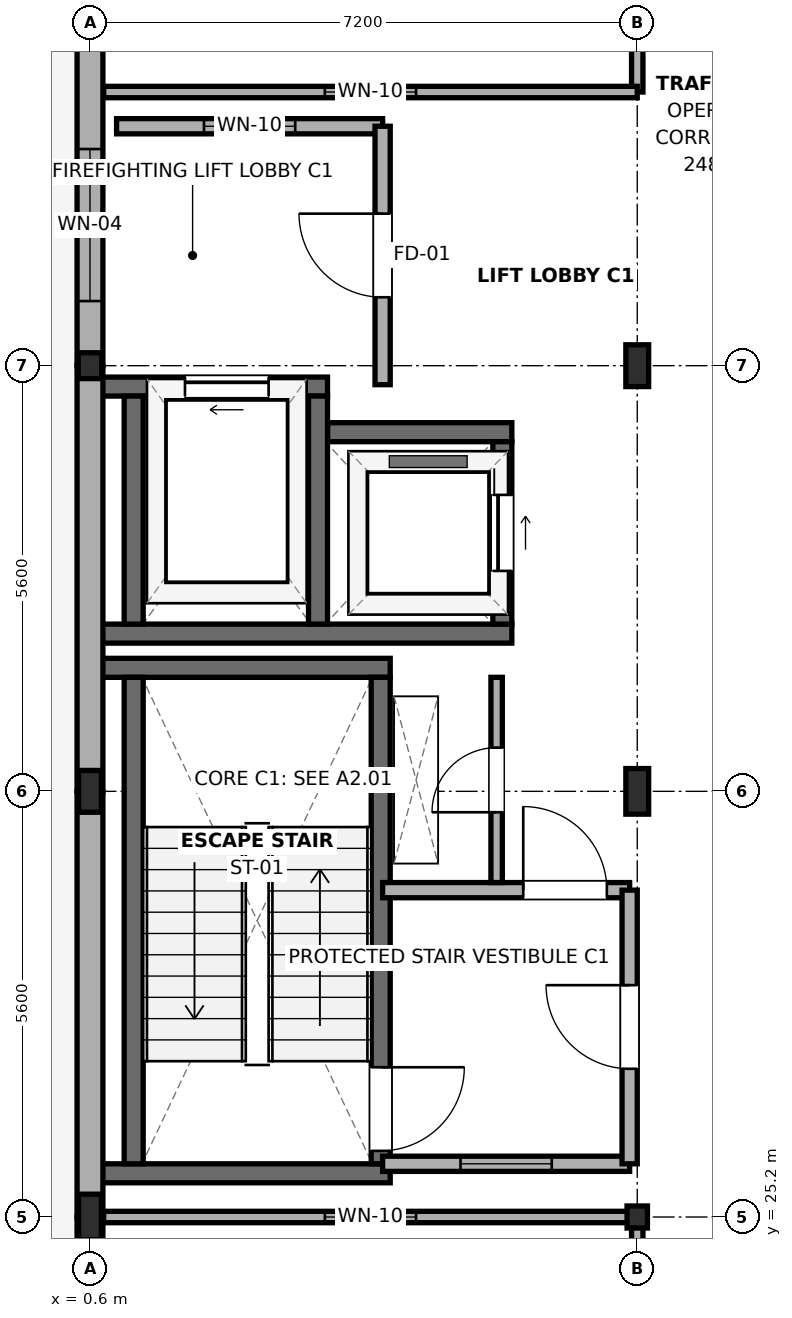
"""IFC4 building model, lengths in metres.
Left out: names, types, materials, properties, quantities, classifications, styles, units other than length and angle.
Written with IfcOpenShell. Run it as: python <this file> out.ifc"""

import sys

from ifc_helpers import new_model, si_unit, direction, frame, frame_2d, origin, origin_2d, place, context, subcontext, project, spatial, rectangle, i_section, extrude, element, fill, save


model = new_model("IFC4")
c1 = context("Model", 3, precision=1e-05, world=origin(), true_north=direction((0.0, 1.0)))
c2 = subcontext(c1, "Body", "Model", "MODEL_VIEW")
j1 = project(units=[si_unit("LENGTHUNIT", "METRE"), si_unit("PLANEANGLEUNIT", "RADIAN")], contexts=[c1])
p1 = place(None, origin())
s1 = spatial("IfcSite", under=j1, at=p1, CompositionType="ELEMENT")
p2 = place(p1, origin())
s2 = spatial("IfcBuilding", under=s1, at=p2, CompositionType="ELEMENT")
p3 = place(p2, frame((0.0, 0.0, 9.0)))
s3 = spatial("IfcBuildingStorey", under=s2, at=p3, CompositionType="ELEMENT", Elevation=9.0)
p4 = place(p3, frame((0.6, 25.2, 0.0), z_axis=(0.0, 0.0, 1.0), x_axis=(1.0, 0.0, 0.0)))
e1 = element("IfcColumn", 1, at=p4, inside=s3, PredefinedType="COLUMN", context=c2, shape_type="SweptSolid", body=[
    extrude(i_section(OverallWidth=0.3, OverallDepth=0.6, WebThickness=0.015, FlangeThickness=0.03, FilletRadius=0.027, at=origin_2d()), origin(), (0.0, 0.0, 1.0), 4.2),
])
p5 = place(p3, frame((0.6, 30.8, 0.0), z_axis=(0.0, 0.0, 1.0), x_axis=(1.0, 0.0, 0.0)))
e2 = element("IfcColumn", 2, at=p5, inside=s3, PredefinedType="COLUMN", context=c2, shape_type="SweptSolid", body=[
    extrude(i_section(OverallWidth=0.3, OverallDepth=0.55, WebThickness=0.015, FlangeThickness=0.029, FilletRadius=0.027, at=origin_2d()), origin(), (0.0, 0.0, 1.0), 4.2),
])
p6 = place(p3, frame((0.6, 36.4, 0.0), z_axis=(0.0, 0.0, 1.0), x_axis=(1.0, 0.0, 0.0)))
e3 = element("IfcColumn", 3, at=p6, inside=s3, PredefinedType="COLUMN", context=c2, shape_type="SweptSolid", body=[
    extrude(i_section(OverallWidth=0.31, OverallDepth=0.34, WebThickness=0.021, FlangeThickness=0.039, FilletRadius=0.027, at=origin_2d()), origin(), (0.0, 0.0, 1.0), 4.2),
])
p7 = place(p3, frame((7.8, 25.2, 0.0), z_axis=(0.0, 0.0, 1.0), x_axis=(1.0, 0.0, 0.0)))
e4 = element("IfcColumn", 4, at=p7, inside=s3, PredefinedType="COLUMN", context=c2, shape_type="SweptSolid", body=[
    extrude(i_section(OverallWidth=0.268, OverallDepth=0.29, WebThickness=0.018, FlangeThickness=0.032, FilletRadius=0.024, at=origin_2d()), origin(), (0.0, 0.0, 1.0), 4.2),
])
p8 = place(p3, frame((7.8, 30.8, 0.0), z_axis=(0.0, 0.0, 1.0), x_axis=(1.0, 0.0, 0.0)))
e5 = element("IfcColumn", 5, at=p8, inside=s3, PredefinedType="COLUMN", context=c2, shape_type="SweptSolid", body=[
    extrude(i_section(OverallWidth=0.3, OverallDepth=0.6, WebThickness=0.015, FlangeThickness=0.03, FilletRadius=0.027, at=origin_2d()), origin(), (0.0, 0.0, 1.0), 4.2),
])
p9 = place(p3, frame((7.8, 36.4, 0.0), z_axis=(0.0, 0.0, 1.0), x_axis=(1.0, 0.0, 0.0)))
e6 = element("IfcColumn", 6, at=p9, inside=s3, PredefinedType="COLUMN", context=c2, shape_type="SweptSolid", body=[
    extrude(i_section(OverallWidth=0.3, OverallDepth=0.55, WebThickness=0.015, FlangeThickness=0.029, FilletRadius=0.027, at=origin_2d()), origin(), (0.0, 0.0, 1.0), 4.2),
])
for number, where, z_axis, x_axis in (
    (7, (0.75, 25.775, 0.0), (0.0, 0.0, 1.0), (1.0, 0.0, 0.0)),
    (8, (0.75, 32.425, 0.0), (0.0, 0.0, 1.0), (1.0, 0.0, 0.0)),
):
    element("IfcWall", number, at=place(p3, frame(where, z_axis=z_axis, x_axis=x_axis)), inside=s3, PredefinedType="SHEAR", context=c2, shape_type="SweptSolid", body=[
        extrude(rectangle(XDim=3.8, YDim=0.25, at=frame_2d((1.9, 0.0))), origin(), (0.0, 0.0, 1.0), 3.98),
    ])
p10 = place(p3, frame((1.175, 25.9, 0.0), z_axis=(0.0, 0.0, 1.0), x_axis=(0.0, 1.0, 0.0)))
e9 = element("IfcWall", 9, at=p10, inside=s3, PredefinedType="SHEAR", context=c2, shape_type="SweptSolid", body=[
    extrude(rectangle(XDim=6.4, YDim=0.25, at=frame_2d((3.2, 0.0))), origin(), (0.0, 0.0, 1.0), 3.98),
])
p11 = place(p3, frame((4.425, 25.9, 0.0), z_axis=(0.0, 0.0, 1.0), x_axis=(0.0, 1.0, 0.0)))
e10 = element("IfcWall", 10, at=p11, inside=s3, PredefinedType="SHEAR", context=c2, shape_type="SweptSolid", body=[
    extrude(rectangle(XDim=6.4, YDim=0.25, at=frame_2d((3.2, 0.0))), origin(), (0.0, 0.0, 1.0), 3.98),
])
p12 = place(p11, frame((0.17, 0.0, 0.0)))
e11 = element("IfcOpeningElement", 11, at=p12, cuts=e10, PredefinedType="OPENING", context=c2, shape_type="SweptSolid", body=[
    extrude(rectangle(XDim=1.1, YDim=2.15, at=frame_2d((0.55, 1.075))), frame((0.0, 0.14, 0.0), z_axis=(0.0, -1.0, 0.0), x_axis=(1.0, 0.0, 0.0)), (0.0, 0.0, 1.0), 0.28),
])
p13 = place(p3, frame((0.75, 32.875, 0.0), z_axis=(0.0, 0.0, 1.0), x_axis=(1.0, 0.0, 0.0)))
e12 = element("IfcWall", 12, at=p13, inside=s3, PredefinedType="SHEAR", context=c2, shape_type="SweptSolid", body=[
    extrude(rectangle(XDim=5.4, YDim=0.25, at=frame_2d((2.7, 0.0))), origin(), (0.0, 0.0, 1.0), 3.98),
])
p14 = place(p3, frame((0.75, 36.125, 0.0), z_axis=(0.0, 0.0, 1.0), x_axis=(1.0, 0.0, 0.0)))
e13 = element("IfcWall", 13, at=p14, inside=s3, PredefinedType="SHEAR", context=c2, shape_type="SweptSolid", body=[
    extrude(rectangle(XDim=2.975, YDim=0.25, at=frame_2d((1.488, 0.0))), origin(), (0.0, 0.0, 1.0), 3.98),
])
p15 = place(p14, frame((1.1, 0.0, 0.0)))
e14 = element("IfcOpeningElement", 14, at=p15, cuts=e13, PredefinedType="OPENING", context=c2, shape_type="SweptSolid", body=[
    extrude(rectangle(XDim=1.1, YDim=2.15, at=frame_2d((0.55, 1.075))), frame((0.0, 0.14, 0.0), z_axis=(0.0, -1.0, 0.0), x_axis=(1.0, 0.0, 0.0)), (0.0, 0.0, 1.0), 0.28),
])
p16 = place(p3, frame((3.725, 35.525, 0.0), z_axis=(0.0, 0.0, 1.0), x_axis=(1.0, 0.0, 0.0)))
e15 = element("IfcWall", 15, at=p16, inside=s3, PredefinedType="SHEAR", context=c2, shape_type="SweptSolid", body=[
    extrude(rectangle(XDim=2.425, YDim=0.25, at=frame_2d((1.212, 0.0))), origin(), (0.0, 0.0, 1.0), 3.98),
])
for number, where, z_axis, x_axis in (
    (16, (1.175, 33.0, 0.0), (0.0, 0.0, 1.0), (0.0, 1.0, 0.0)),
    (17, (3.6, 33.0, 0.0), (0.0, 0.0, 1.0), (0.0, 1.0, 0.0)),
):
    element("IfcWall", number, at=place(p3, frame(where, z_axis=z_axis, x_axis=x_axis)), inside=s3, PredefinedType="SHEAR", context=c2, shape_type="SweptSolid", body=[
        extrude(rectangle(XDim=3.0, YDim=0.25, at=frame_2d((1.5, 0.0))), origin(), (0.0, 0.0, 1.0), 3.98),
    ])
p17 = place(p3, frame((6.025, 33.0, 0.0), z_axis=(0.0, 0.0, 1.0), x_axis=(0.0, 1.0, 0.0)))
e18 = element("IfcWall", 18, at=p17, inside=s3, PredefinedType="SHEAR", context=c2, shape_type="SweptSolid", body=[
    extrude(rectangle(XDim=2.4, YDim=0.25, at=frame_2d((1.2, 0.0))), origin(), (0.0, 0.0, 1.0), 3.98),
])
p18 = place(p17, frame((0.7, 0.0, 0.0)))
e19 = element("IfcOpeningElement", 19, at=p18, cuts=e18, PredefinedType="OPENING", context=c2, shape_type="SweptSolid", body=[
    extrude(rectangle(XDim=1.0, YDim=2.15, at=frame_2d((0.5, 1.075))), frame((0.0, 0.14, 0.0), z_axis=(0.0, -1.0, 0.0), x_axis=(1.0, 0.0, 0.0)), (0.0, 0.0, 1.0), 0.28),
])
p19 = place(p3, frame((0.6, 17.23, 0.0), z_axis=(0.0, 0.0, 1.0), x_axis=(0.0, 1.0, 0.0)))
e20 = element("IfcWall", 20, at=p19, inside=s3, PredefinedType="SOLIDWALL", context=c2, shape_type="SweptSolid", body=[
    extrude(rectangle(XDim=7.97, YDim=0.34, at=frame_2d((3.985, 0.0))), origin(), (0.0, 0.0, 1.0), 3.525),
])
p20 = place(p3, frame((0.6, 25.2, 0.0), z_axis=(0.0, 0.0, 1.0), x_axis=(0.0, 1.0, 0.0)))
e21 = element("IfcWall", 21, at=p20, inside=s3, PredefinedType="SOLIDWALL", context=c2, shape_type="SweptSolid", body=[
    extrude(rectangle(XDim=5.6, YDim=0.34, at=frame_2d((2.8, 0.0))), origin(), (0.0, 0.0, 1.0), 3.625),
])
p21 = place(p3, frame((0.6, 30.8, 0.0), z_axis=(0.0, 0.0, 1.0), x_axis=(0.0, 1.0, 0.0)))
e22 = element("IfcWall", 22, at=p21, inside=s3, PredefinedType="SOLIDWALL", context=c2, shape_type="SweptSolid", body=[
    extrude(rectangle(XDim=5.6, YDim=0.34, at=frame_2d((2.8, 0.0))), origin(), (0.0, 0.0, 1.0), 3.375),
])
p22 = place(p3, frame((0.6, 36.4, 0.0), z_axis=(0.0, 0.0, 1.0), x_axis=(0.0, 1.0, 0.0)))
e23 = element("IfcWall", 23, at=p22, inside=s3, PredefinedType="SOLIDWALL", context=c2, shape_type="SweptSolid", body=[
    extrude(rectangle(XDim=5.6, YDim=0.34, at=frame_2d((2.8, 0.0))), origin(), (0.0, 0.0, 1.0), 3.375),
])
p23 = place(p22, frame((0.85, 0.0, 0.9)))
e24 = element("IfcOpeningElement", 24, at=p23, cuts=e23, PredefinedType="OPENING", context=c2, shape_type="SweptSolid", body=[
    extrude(rectangle(XDim=2.0, YDim=1.8, at=frame_2d((1.0, 0.9))), frame((0.0, 0.185, 0.0), z_axis=(0.0, -1.0, 0.0), x_axis=(1.0, 0.0, 0.0)), (0.0, 0.0, 1.0), 0.37),
])
p24 = place(p3, frame((0.95, 39.55, 0.0), z_axis=(0.0, 0.0, 1.0), x_axis=(1.0, 0.0, 0.0)))
e25 = element("IfcWall", 25, at=p24, inside=s3, PredefinedType="PARTITIONING", context=c2, shape_type="SweptSolid", body=[
    extrude(rectangle(XDim=3.5, YDim=0.2, at=frame_2d((1.75, 0.0))), origin(), (0.0, 0.0, 1.0), 3.975),
])
p25 = place(p24, frame((1.15, 0.0, 0.95)))
e26 = element("IfcOpeningElement", 26, at=p25, cuts=e25, PredefinedType="OPENING", context=c2, shape_type="SweptSolid", body=[
    extrude(rectangle(XDim=1.2, YDim=1.5, at=frame_2d((0.6, 0.75))), frame((0.0, 0.115, 0.0), z_axis=(0.0, -1.0, 0.0), x_axis=(1.0, 0.0, 0.0)), (0.0, 0.0, 1.0), 0.23),
])
p26 = place(p3, frame((4.45, 36.15, 0.0), z_axis=(0.0, 0.0, 1.0), x_axis=(0.0, 1.0, 0.0)))
e27 = element("IfcWall", 27, at=p26, inside=s3, PredefinedType="PARTITIONING", context=c2, shape_type="SweptSolid", body=[
    extrude(rectangle(XDim=3.4, YDim=0.2, at=frame_2d((1.7, 0.0))), origin(), (0.0, 0.0, 1.0), 3.645),
])
p27 = place(p26, frame((1.15, 0.0, 0.0)))
e28 = element("IfcOpeningElement", 28, at=p27, cuts=e27, PredefinedType="OPENING", context=c2, shape_type="SweptSolid", body=[
    extrude(rectangle(XDim=1.1, YDim=2.15, at=frame_2d((0.55, 1.075))), frame((0.0, 0.115, 0.0), z_axis=(0.0, -1.0, 0.0), x_axis=(1.0, 0.0, 0.0)), (0.0, 0.0, 1.0), 0.23),
])
p28 = place(p3, frame((4.45, 25.9, 0.0), z_axis=(0.0, 0.0, 1.0), x_axis=(1.0, 0.0, 0.0)))
e29 = element("IfcWall", 29, at=p28, inside=s3, PredefinedType="PARTITIONING", context=c2, shape_type="SweptSolid", body=[
    extrude(rectangle(XDim=3.25, YDim=0.2, at=frame_2d((1.625, 0.0))), origin(), (0.0, 0.0, 1.0), 3.475),
])
p29 = place(p28, frame((1.025, 0.0, 0.95)))
e30 = element("IfcOpeningElement", 30, at=p29, cuts=e29, PredefinedType="OPENING", context=c2, shape_type="SweptSolid", body=[
    extrude(rectangle(XDim=1.2, YDim=1.5, at=frame_2d((0.6, 0.75))), frame((0.0, 0.115, 0.0), z_axis=(0.0, -1.0, 0.0), x_axis=(1.0, 0.0, 0.0)), (0.0, 0.0, 1.0), 0.23),
])
p30 = place(p3, frame((4.45, 29.5, 0.0), z_axis=(0.0, 0.0, 1.0), x_axis=(1.0, 0.0, 0.0)))
e31 = element("IfcWall", 31, at=p30, inside=s3, PredefinedType="PARTITIONING", context=c2, shape_type="SweptSolid", body=[
    extrude(rectangle(XDim=3.25, YDim=0.2, at=frame_2d((1.625, 0.0))), origin(), (0.0, 0.0, 1.0), 3.475),
])
p31 = place(p30, frame((1.85, 0.0, 0.0)))
e32 = element("IfcOpeningElement", 32, at=p31, cuts=e31, PredefinedType="OPENING", context=c2, shape_type="SweptSolid", body=[
    extrude(rectangle(XDim=1.1, YDim=2.15, at=frame_2d((0.55, 1.075))), frame((0.0, 0.115, 0.0), z_axis=(0.0, -1.0, 0.0), x_axis=(1.0, 0.0, 0.0)), (0.0, 0.0, 1.0), 0.23),
])
p32 = place(p3, frame((7.7, 25.9, 0.0), z_axis=(0.0, 0.0, 1.0), x_axis=(0.0, 1.0, 0.0)))
e33 = element("IfcWall", 33, at=p32, inside=s3, PredefinedType="PARTITIONING", context=c2, shape_type="SweptSolid", body=[
    extrude(rectangle(XDim=3.6, YDim=0.2, at=frame_2d((1.8, 0.0))), origin(), (0.0, 0.0, 1.0), 3.475),
])
p33 = place(p32, frame((1.25, 0.0, 0.0)))
e34 = element("IfcOpeningElement", 34, at=p33, cuts=e33, PredefinedType="OPENING", context=c2, shape_type="SweptSolid", body=[
    extrude(rectangle(XDim=1.1, YDim=2.15, at=frame_2d((0.55, 1.075))), frame((0.0, 0.115, 0.0), z_axis=(0.0, -1.0, 0.0), x_axis=(1.0, 0.0, 0.0)), (0.0, 0.0, 1.0), 0.23),
])
p34 = place(p3, frame((5.95, 29.6, 0.0), z_axis=(0.0, 0.0, 1.0), x_axis=(0.0, 1.0, 0.0)))
e35 = element("IfcWall", 35, at=p34, inside=s3, PredefinedType="PARTITIONING", context=c2, shape_type="SweptSolid", body=[
    extrude(rectangle(XDim=2.7, YDim=0.15, at=frame_2d((1.35, 0.0))), origin(), (0.0, 0.0, 1.0), 3.975),
])
p35 = place(p34, frame((0.925, 0.0, 0.0)))
e36 = element("IfcOpeningElement", 36, at=p35, cuts=e35, PredefinedType="OPENING", context=c2, shape_type="SweptSolid", body=[
    extrude(rectangle(XDim=0.85, YDim=2.1, at=frame_2d((0.425, 1.05))), frame((0.0, 0.09, 0.0), z_axis=(0.0, -1.0, 0.0), x_axis=(1.0, 0.0, 0.0)), (0.0, 0.0, 1.0), 0.18),
])
p36 = place(p3, frame((7.8, 17.56, 0.0), z_axis=(0.0, 0.0, 1.0), x_axis=(0.0, 1.0, 0.0)))
e37 = element("IfcWall", 37, at=p36, inside=s3, PredefinedType="PARTITIONING", context=c2, shape_type="SweptSolid", body=[
    extrude(rectangle(XDim=7.64, YDim=0.15, at=frame_2d((3.82, 0.0))), origin(), (0.0, 0.0, 1.0), 3.425),
])
p37 = place(p36, frame((3.295, 0.0, 0.0)))
e38 = element("IfcOpeningElement", 38, at=p37, cuts=e37, PredefinedType="OPENING", context=c2, shape_type="SweptSolid", body=[
    extrude(rectangle(XDim=1.05, YDim=2.15, at=frame_2d((0.525, 1.075))), frame((0.0, 0.09, 0.0), z_axis=(0.0, -1.0, 0.0), x_axis=(1.0, 0.0, 0.0)), (0.0, 0.0, 1.0), 0.18),
])
p38 = place(p3, frame((0.78, 25.2, 0.0), z_axis=(0.0, 0.0, 1.0), x_axis=(1.0, 0.0, 0.0)))
e39 = element("IfcWall", 39, at=p38, inside=s3, PredefinedType="PARTITIONING", context=c2, shape_type="SweptSolid", body=[
    extrude(rectangle(XDim=7.02, YDim=0.15, at=frame_2d((3.51, 0.0))), origin(), (0.0, 0.0, 1.0), 3.425),
])
p39 = place(p38, frame((2.91, 0.0, 0.95)))
e40 = element("IfcOpeningElement", 40, at=p39, cuts=e39, PredefinedType="OPENING", context=c2, shape_type="SweptSolid", body=[
    extrude(rectangle(XDim=1.2, YDim=1.5, at=frame_2d((0.6, 0.75))), frame((0.0, 0.09, 0.0), z_axis=(0.0, -1.0, 0.0), x_axis=(1.0, 0.0, 0.0)), (0.0, 0.0, 1.0), 0.18),
])
p40 = place(p3, frame((7.8, 40.0, 0.0), z_axis=(0.0, 0.0, 1.0), x_axis=(0.0, 1.0, 0.0)))
e41 = element("IfcWall", 41, at=p40, inside=s3, PredefinedType="PARTITIONING", context=c2, shape_type="SweptSolid", body=[
    extrude(rectangle(XDim=26.6, YDim=0.15, at=frame_2d((13.3, 0.0))), origin(), (0.0, 0.0, 1.0), 3.375),
])
p41 = place(p40, frame((13.4, 0.0, 0.0)))
e42 = element("IfcOpeningElement", 42, at=p41, cuts=e41, PredefinedType="OPENING", context=c2, shape_type="SweptSolid", body=[
    extrude(rectangle(XDim=1.6, YDim=2.15, at=frame_2d((0.8, 1.075))), frame((0.0, 0.09, 0.0), z_axis=(0.0, -1.0, 0.0), x_axis=(1.0, 0.0, 0.0)), (0.0, 0.0, 1.0), 0.18),
])
p42 = place(p3, frame((0.78, 40.0, 0.0), z_axis=(0.0, 0.0, 1.0), x_axis=(1.0, 0.0, 0.0)))
e43 = element("IfcWall", 43, at=p42, inside=s3, PredefinedType="PARTITIONING", context=c2, shape_type="SweptSolid", body=[
    extrude(rectangle(XDim=7.02, YDim=0.15, at=frame_2d((3.51, 0.0))), origin(), (0.0, 0.0, 1.0), 3.375),
])
p43 = place(p42, frame((2.91, 0.0, 0.95)))
e44 = element("IfcOpeningElement", 44, at=p43, cuts=e43, PredefinedType="OPENING", context=c2, shape_type="SweptSolid", body=[
    extrude(rectangle(XDim=1.2, YDim=1.5, at=frame_2d((0.6, 0.75))), frame((0.0, 0.09, 0.0), z_axis=(0.0, -1.0, 0.0), x_axis=(1.0, 0.0, 0.0)), (0.0, 0.0, 1.0), 0.18),
])
p44 = place(p23, origin())
e45 = element("IfcWindow", 45, at=p44, inside=s3, PartitioningType="SINGLE_PANEL", PredefinedType="WINDOW", context=c2, shape_type="SweptSolid", body=[
    extrude(rectangle(XDim=2.0, YDim=1.8, at=frame_2d((1.0, 0.9))), frame((0.0, 0.03, 0.0), z_axis=(0.0, -1.0, 0.0), x_axis=(1.0, 0.0, 0.0)), (0.0, 0.0, 1.0), 0.06),
])
fill(e24, e45)
p45 = place(p12, frame((1.1, 0.0, 0.0), z_axis=(0.0, 0.0, 1.0), x_axis=(-1.0, 0.0, 0.0)))
e46 = element("IfcDoor", 46, at=p45, inside=s3, OperationType="SINGLE_SWING_LEFT", PredefinedType="DOOR", context=c2, shape_type="SweptSolid", body=[
    extrude(rectangle(XDim=1.1, YDim=2.15, at=frame_2d((0.55, 1.075))), frame((0.0, 0.025, 0.0), z_axis=(0.0, -1.0, 0.0), x_axis=(1.0, 0.0, 0.0)), (0.0, 0.0, 1.0), 0.05),
])
fill(e11, e46)
p46 = place(p15, origin())
e47 = element("IfcDoor", 47, at=p46, inside=s3, OperationType="SLIDING_TO_LEFT", PredefinedType="DOOR", context=c2, shape_type="SweptSolid", body=[
    extrude(rectangle(XDim=1.1, YDim=2.15, at=frame_2d((0.55, 1.075))), frame((0.0, 0.025, 0.0), z_axis=(0.0, -1.0, 0.0), x_axis=(1.0, 0.0, 0.0)), (0.0, 0.0, 1.0), 0.05),
])
fill(e14, e47)
p47 = place(p18, frame((1.0, 0.0, 0.0), z_axis=(0.0, 0.0, 1.0), x_axis=(-1.0, 0.0, 0.0)))
e48 = element("IfcDoor", 48, at=p47, inside=s3, OperationType="SLIDING_TO_RIGHT", PredefinedType="DOOR", context=c2, shape_type="SweptSolid", body=[
    extrude(rectangle(XDim=1.0, YDim=2.15, at=frame_2d((0.5, 1.075))), frame((0.0, 0.025, 0.0), z_axis=(0.0, -1.0, 0.0), x_axis=(1.0, 0.0, 0.0)), (0.0, 0.0, 1.0), 0.05),
])
fill(e19, e48)
p48 = place(p25, origin())
e49 = element("IfcWindow", 49, at=p48, inside=s3, PartitioningType="SINGLE_PANEL", PredefinedType="WINDOW", context=c2, shape_type="SweptSolid", body=[
    extrude(rectangle(XDim=1.2, YDim=1.5, at=frame_2d((0.6, 0.75))), frame((0.0, 0.03, 0.0), z_axis=(0.0, -1.0, 0.0), x_axis=(1.0, 0.0, 0.0)), (0.0, 0.0, 1.0), 0.06),
])
fill(e26, e49)
p49 = place(p27, origin())
e50 = element("IfcDoor", 50, at=p49, inside=s3, OperationType="SINGLE_SWING_RIGHT", PredefinedType="DOOR", context=c2, shape_type="SweptSolid", body=[
    extrude(rectangle(XDim=1.1, YDim=2.15, at=frame_2d((0.55, 1.075))), frame((0.0, 0.025, 0.0), z_axis=(0.0, -1.0, 0.0), x_axis=(1.0, 0.0, 0.0)), (0.0, 0.0, 1.0), 0.05),
])
fill(e28, e50)
p50 = place(p29, origin())
e51 = element("IfcWindow", 51, at=p50, inside=s3, PartitioningType="SINGLE_PANEL", PredefinedType="WINDOW", context=c2, shape_type="SweptSolid", body=[
    extrude(rectangle(XDim=1.2, YDim=1.5, at=frame_2d((0.6, 0.75))), frame((0.0, 0.03, 0.0), z_axis=(0.0, -1.0, 0.0), x_axis=(1.0, 0.0, 0.0)), (0.0, 0.0, 1.0), 0.06),
])
fill(e30, e51)
p51 = place(p31, origin())
e52 = element("IfcDoor", 52, at=p51, inside=s3, OperationType="SINGLE_SWING_LEFT", PredefinedType="DOOR", context=c2, shape_type="SweptSolid", body=[
    extrude(rectangle(XDim=1.1, YDim=2.15, at=frame_2d((0.55, 1.075))), frame((0.0, 0.025, 0.0), z_axis=(0.0, -1.0, 0.0), x_axis=(1.0, 0.0, 0.0)), (0.0, 0.0, 1.0), 0.05),
])
fill(e32, e52)
p52 = place(p33, origin())
e53 = element("IfcDoor", 53, at=p52, inside=s3, OperationType="SINGLE_SWING_RIGHT", PredefinedType="DOOR", context=c2, shape_type="SweptSolid", body=[
    extrude(rectangle(XDim=1.1, YDim=2.15, at=frame_2d((0.55, 1.075))), frame((0.0, 0.025, 0.0), z_axis=(0.0, -1.0, 0.0), x_axis=(1.0, 0.0, 0.0)), (0.0, 0.0, 1.0), 0.05),
])
fill(e34, e53)
p53 = place(p35, origin())
e54 = element("IfcDoor", 54, at=p53, inside=s3, OperationType="SINGLE_SWING_LEFT", PredefinedType="DOOR", context=c2, shape_type="SweptSolid", body=[
    extrude(rectangle(XDim=0.85, YDim=2.1, at=frame_2d((0.425, 1.05))), frame((0.0, 0.025, 0.0), z_axis=(0.0, -1.0, 0.0), x_axis=(1.0, 0.0, 0.0)), (0.0, 0.0, 1.0), 0.05),
])
fill(e36, e54)
p54 = place(p39, origin())
e55 = element("IfcWindow", 55, at=p54, inside=s3, PartitioningType="SINGLE_PANEL", PredefinedType="WINDOW", context=c2, shape_type="SweptSolid", body=[
    extrude(rectangle(XDim=1.2, YDim=1.5, at=frame_2d((0.6, 0.75))), frame((0.0, 0.03, 0.0), z_axis=(0.0, -1.0, 0.0), x_axis=(1.0, 0.0, 0.0)), (0.0, 0.0, 1.0), 0.06),
])
fill(e40, e55)
p55 = place(p43, origin())
e56 = element("IfcWindow", 56, at=p55, inside=s3, PartitioningType="SINGLE_PANEL", PredefinedType="WINDOW", context=c2, shape_type="SweptSolid", body=[
    extrude(rectangle(XDim=1.2, YDim=1.5, at=frame_2d((0.6, 0.75))), frame((0.0, 0.03, 0.0), z_axis=(0.0, -1.0, 0.0), x_axis=(1.0, 0.0, 0.0)), (0.0, 0.0, 1.0), 0.06),
])
fill(e44, e56)
save(model, sys.argv[1])
